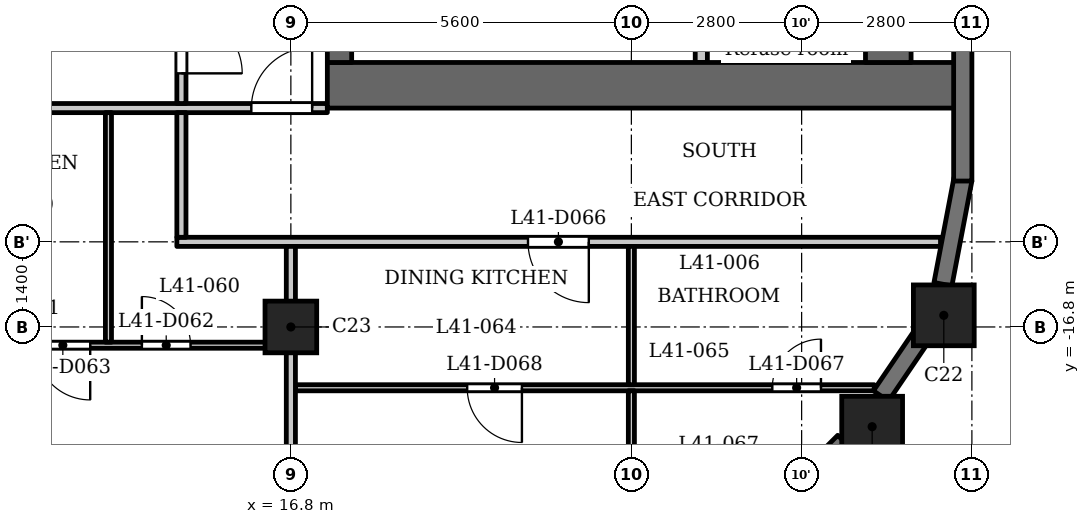
"""IFC4 building model, lengths in metres.
Left out: names, types, materials, properties, quantities, classifications, styles, units other than length and angle.
Written with IfcOpenShell. Run it as: python <this file> out.ifc"""

import sys

from ifc_helpers import new_model, si_unit, direction, frame, frame_2d, origin, origin_2d, place, context, subcontext, project, spatial, rectangle, extrude, element, fill, save


model = new_model("IFC4")
c1 = context("Model", 3, precision=1e-05, world=origin(), true_north=direction((0.0, 1.0)))
c2 = subcontext(c1, "Body", "Model", "MODEL_VIEW")
j1 = project(units=[si_unit("LENGTHUNIT", "METRE"), si_unit("PLANEANGLEUNIT", "RADIAN")], contexts=[c1])
p1 = place(None, origin())
s1 = spatial("IfcSite", under=j1, at=p1, CompositionType="ELEMENT")
p2 = place(p1, origin())
s2 = spatial("IfcBuilding", under=s1, at=p2, CompositionType="ELEMENT")
p3 = place(p2, frame((0.0, 0.0, 160.6)))
s3 = spatial("IfcBuildingStorey", under=s2, at=p3, CompositionType="ELEMENT", Elevation=160.6)
for number, where, z_axis, x_axis in (
    (1, (26.36, -18.44, 0.0), (0.0, 0.0, 1.0), (1.0, 0.0, 0.0)),
    (2, (27.538, -16.609, 0.0), (0.0, 0.0, 1.0), (1.0, 0.0, 0.0)),
):
    element("IfcColumn", number, at=place(p3, frame(where, z_axis=z_axis, x_axis=x_axis)), inside=s3, PredefinedType="COLUMN", context=c2, shape_type="SweptSolid", body=[
        extrude(rectangle(XDim=1.0, YDim=1.0, at=origin_2d()), origin(), (0.0, 0.0, 1.0), 3.5),
    ])
p4 = place(p3, frame((16.8, -16.8, 0.0), z_axis=(0.0, 0.0, 1.0), x_axis=(1.0, 0.0, 0.0)))
e3 = element("IfcColumn", 3, at=p4, inside=s3, PredefinedType="COLUMN", context=c2, shape_type="SweptSolid", body=[
    extrude(rectangle(XDim=0.85, YDim=0.85, at=origin_2d()), origin(), (0.0, 0.0, 1.0), 3.5),
])
p5 = place(p3, frame((23.991, -20.597, 0.0), z_axis=(0.0, 0.0, 1.0), x_axis=(0.707106781187, 0.707106781187, 0.0)))
e4 = element("IfcWall", 4, at=p5, inside=s3, PredefinedType="SOLIDWALL", context=c2, shape_type="SweptSolid", body=[
    extrude(rectangle(XDim=2.7, YDim=0.3, at=frame_2d((1.35, 0.0))), origin(), (0.0, 0.0, 1.0), 2.45),
])
p6 = place(p5, frame((0.75, 0.0, 0.6)))
e5 = element("IfcOpeningElement", 5, at=p6, cuts=e4, PredefinedType="OPENING", context=c2, shape_type="SweptSolid", body=[
    extrude(rectangle(XDim=1.2, YDim=1.55, at=frame_2d((0.6, 0.775))), frame((0.0, 0.16, 0.0), z_axis=(0.0, -1.0, 0.0), x_axis=(1.0, 0.0, 0.0)), (0.0, 0.0, 1.0), 0.32),
])
p7 = place(p3, frame((26.504, -17.934, 0.0), z_axis=(0.0, 0.0, 1.0), x_axis=(0.562145470373, 0.827038372833, 0.0)))
e6 = element("IfcWall", 6, at=p7, inside=s3, PredefinedType="SOLIDWALL", context=c2, shape_type="SweptSolid", body=[
    extrude(rectangle(XDim=1.177, YDim=0.3, at=frame_2d((0.588, 0.0))), origin(), (0.0, 0.0, 1.0), 3.2),
])
p8 = place(p3, frame((27.524, -16.097, 0.0), z_axis=(0.0, 0.0, 1.0), x_axis=(0.187259034321, 0.982310569049, 0.0)))
e7 = element("IfcWall", 7, at=p8, inside=s3, PredefinedType="SOLIDWALL", context=c2, shape_type="SweptSolid", body=[
    extrude(rectangle(XDim=1.756, YDim=0.3, at=frame_2d((0.878, 0.0))), origin(), (0.0, 0.0, 1.0), 2.45),
])
p9 = place(p3, frame((27.85, -14.4, 0.0), z_axis=(0.0, 0.0, 1.0), x_axis=(0.0, 1.0, 0.0)))
e8 = element("IfcWall", 8, at=p9, inside=s3, PredefinedType="SOLIDWALL", context=c2, shape_type="SweptSolid", body=[
    extrude(rectangle(XDim=2.7, YDim=0.3, at=frame_2d((1.35, 0.0))), origin(), (0.0, 0.0, 1.0), 2.45),
])
p10 = place(p3, frame((17.4, -12.825, 0.0), z_axis=(0.0, 0.0, 1.0), x_axis=(1.0, 0.0, 0.0)))
e9 = element("IfcWall", 9, at=p10, inside=s3, PredefinedType="SHEAR", context=c2, shape_type="SweptSolid", body=[
    extrude(rectangle(XDim=10.4, YDim=0.75, at=frame_2d((5.2, 0.0))), origin(), (0.0, 0.0, 1.0), 3.2),
])
p11 = place(p3, frame((17.6, -12.45, 0.0), z_axis=(0.0, 0.0, 1.0), x_axis=(0.0, 1.0, 0.0)))
e10 = element("IfcWall", 10, at=p11, inside=s3, PredefinedType="SHEAR", context=c2, shape_type="SweptSolid", body=[
    extrude(rectangle(XDim=24.9, YDim=0.4, at=frame_2d((12.45, 0.0))), origin(), (0.0, 0.0, 1.0), 3.2),
])
p12 = place(p11, frame((8.65, 0.0, 0.0)))
e11 = element("IfcOpeningElement", 11, at=p12, cuts=e10, PredefinedType="OPENING", context=c2, shape_type="SweptSolid", body=[
    extrude(rectangle(XDim=0.9, YDim=2.1, at=frame_2d((0.45, 1.05))), frame((0.0, 0.21, 0.0), z_axis=(0.0, -1.0, 0.0), x_axis=(1.0, 0.0, 0.0)), (0.0, 0.0, 1.0), 0.42),
])
p13 = place(p11, frame((15.6, 0.0, 0.0)))
e12 = element("IfcOpeningElement", 12, at=p13, cuts=e10, PredefinedType="OPENING", context=c2, shape_type="SweptSolid", body=[
    extrude(rectangle(XDim=1.1, YDim=2.1, at=frame_2d((0.55, 1.05))), frame((0.0, 0.21, 0.0), z_axis=(0.0, -1.0, 0.0), x_axis=(1.0, 0.0, 0.0)), (0.0, 0.0, 1.0), 0.42),
])
p14 = place(p11, frame((18.0, 0.0, 0.0)))
e13 = element("IfcOpeningElement", 13, at=p14, cuts=e10, PredefinedType="OPENING", context=c2, shape_type="SweptSolid", body=[
    extrude(rectangle(XDim=1.1, YDim=2.1, at=frame_2d((0.55, 1.05))), frame((0.0, 0.21, 0.0), z_axis=(0.0, -1.0, 0.0), x_axis=(1.0, 0.0, 0.0)), (0.0, 0.0, 1.0), 0.42),
])
p15 = place(p11, frame((23.025, 0.0, 0.0)))
e14 = element("IfcOpeningElement", 14, at=p15, cuts=e10, PredefinedType="OPENING", context=c2, shape_type="SweptSolid", body=[
    extrude(rectangle(XDim=1.1, YDim=2.1, at=frame_2d((0.55, 1.05))), frame((0.0, 0.21, 0.0), z_axis=(0.0, -1.0, 0.0), x_axis=(1.0, 0.0, 0.0)), (0.0, 0.0, 1.0), 0.42),
])
p16 = place(p11, frame((0.775, 0.0, 0.0)))
e15 = element("IfcOpeningElement", 15, at=p16, cuts=e10, PredefinedType="OPENING", context=c2, shape_type="SweptSolid", body=[
    extrude(rectangle(XDim=1.1, YDim=2.1, at=frame_2d((0.55, 1.05))), frame((0.0, 0.21, 0.0), z_axis=(0.0, -1.0, 0.0), x_axis=(1.0, 0.0, 0.0)), (0.0, 0.0, 1.0), 0.42),
])
p17 = place(p11, frame((12.925, 0.0, 0.0)))
e16 = element("IfcOpeningElement", 16, at=p17, cuts=e10, PredefinedType="OPENING", context=c2, shape_type="SweptSolid", body=[
    extrude(rectangle(XDim=1.8, YDim=2.1, at=frame_2d((0.9, 1.05))), frame((0.0, 0.21, 0.0), z_axis=(0.0, -1.0, 0.0), x_axis=(1.0, 0.0, 0.0)), (0.0, 0.0, 1.0), 0.42),
])
p18 = place(p3, frame((26.625, -12.45, 0.0), z_axis=(0.0, 0.0, 1.0), x_axis=(0.0, 1.0, 0.0)))
e17 = element("IfcWall", 17, at=p18, inside=s3, PredefinedType="SHEAR", context=c2, shape_type="SweptSolid", body=[
    extrude(rectangle(XDim=24.9, YDim=0.75, at=frame_2d((12.45, 0.0))), origin(), (0.0, 0.0, 1.0), 3.2),
])
p19 = place(p3, frame((23.55, -12.45, 0.0), z_axis=(0.0, 0.0, 1.0), x_axis=(0.0, 1.0, 0.0)))
e18 = element("IfcWall", 18, at=p19, inside=s3, PredefinedType="PARTITIONING", context=c2, shape_type="SweptSolid", body=[
    extrude(rectangle(XDim=2.65, YDim=0.2, at=frame_2d((1.325, 0.0))), origin(), (0.0, 0.0, 1.0), 3.2),
])
p20 = place(p19, frame((0.875, 0.0, 0.0)))
e19 = element("IfcOpeningElement", 19, at=p20, cuts=e18, PredefinedType="OPENING", context=c2, shape_type="SweptSolid", body=[
    extrude(rectangle(XDim=0.9, YDim=2.1, at=frame_2d((0.45, 1.05))), frame((0.0, 0.11, 0.0), z_axis=(0.0, -1.0, 0.0), x_axis=(1.0, 0.0, 0.0)), (0.0, 0.0, 1.0), 0.22),
])
p21 = place(p3, frame((16.875, -17.8, 0.0), z_axis=(0.0, 0.0, 1.0), x_axis=(1.0, 0.0, 0.0)))
e20 = element("IfcWall", 20, at=p21, inside=s3, PredefinedType="PARTITIONING", context=c2, shape_type="SweptSolid", body=[
    extrude(rectangle(XDim=9.519, YDim=0.1, at=frame_2d((4.76, 0.0))), origin(), (0.0, 0.0, 1.0), 3.2),
])
p22 = place(p21, frame((7.843, 0.0, 0.0)))
e21 = element("IfcOpeningElement", 21, at=p22, cuts=e20, PredefinedType="OPENING", context=c2, shape_type="SweptSolid", body=[
    extrude(rectangle(XDim=0.8, YDim=2.1, at=frame_2d((0.4, 1.05))), frame((0.0, 0.06, 0.0), z_axis=(0.0, -1.0, 0.0), x_axis=(1.0, 0.0, 0.0)), (0.0, 0.0, 1.0), 0.12),
])
p23 = place(p21, frame((2.825, 0.0, 0.0)))
e22 = element("IfcOpeningElement", 22, at=p23, cuts=e20, PredefinedType="OPENING", context=c2, shape_type="SweptSolid", body=[
    extrude(rectangle(XDim=0.9, YDim=2.1, at=frame_2d((0.45, 1.05))), frame((0.0, 0.06, 0.0), z_axis=(0.0, -1.0, 0.0), x_axis=(1.0, 0.0, 0.0)), (0.0, 0.0, 1.0), 0.12),
])
p24 = place(p3, frame((-16.725, -17.1, 0.0), z_axis=(0.0, 0.0, 1.0), x_axis=(1.0, 0.0, 0.0)))
e23 = element("IfcWall", 23, at=p24, inside=s3, PredefinedType="PARTITIONING", context=c2, shape_type="SweptSolid", body=[
    extrude(rectangle(XDim=33.45, YDim=0.1, at=frame_2d((16.725, 0.0))), origin(), (0.0, 0.0, 1.0), 3.2),
])
p25 = place(p24, frame((0.725, 0.0, 0.0)))
e24 = element("IfcOpeningElement", 24, at=p25, cuts=e23, PredefinedType="OPENING", context=c2, shape_type="SweptSolid", body=[
    extrude(rectangle(XDim=0.8, YDim=2.1, at=frame_2d((0.4, 1.05))), frame((0.0, 0.06, 0.0), z_axis=(0.0, -1.0, 0.0), x_axis=(1.0, 0.0, 0.0)), (0.0, 0.0, 1.0), 0.12),
])
p26 = place(p24, frame((3.175, 0.0, 0.0)))
e25 = element("IfcOpeningElement", 25, at=p26, cuts=e23, PredefinedType="OPENING", context=c2, shape_type="SweptSolid", body=[
    extrude(rectangle(XDim=0.9, YDim=2.1, at=frame_2d((0.45, 1.05))), frame((0.0, 0.06, 0.0), z_axis=(0.0, -1.0, 0.0), x_axis=(1.0, 0.0, 0.0)), (0.0, 0.0, 1.0), 0.12),
])
p27 = place(p24, frame((6.075, 0.0, 0.0)))
e26 = element("IfcOpeningElement", 26, at=p27, cuts=e23, PredefinedType="OPENING", context=c2, shape_type="SweptSolid", body=[
    extrude(rectangle(XDim=0.8, YDim=2.1, at=frame_2d((0.4, 1.05))), frame((0.0, 0.06, 0.0), z_axis=(0.0, -1.0, 0.0), x_axis=(1.0, 0.0, 0.0)), (0.0, 0.0, 1.0), 0.12),
])
p28 = place(p24, frame((9.425, 0.0, 0.0)))
e27 = element("IfcOpeningElement", 27, at=p28, cuts=e23, PredefinedType="OPENING", context=c2, shape_type="SweptSolid", body=[
    extrude(rectangle(XDim=0.9, YDim=2.1, at=frame_2d((0.45, 1.05))), frame((0.0, 0.06, 0.0), z_axis=(0.0, -1.0, 0.0), x_axis=(1.0, 0.0, 0.0)), (0.0, 0.0, 1.0), 0.12),
])
p29 = place(p24, frame((12.675, 0.0, 0.0)))
e28 = element("IfcOpeningElement", 28, at=p29, cuts=e23, PredefinedType="OPENING", context=c2, shape_type="SweptSolid", body=[
    extrude(rectangle(XDim=0.8, YDim=2.1, at=frame_2d((0.4, 1.05))), frame((0.0, 0.06, 0.0), z_axis=(0.0, -1.0, 0.0), x_axis=(1.0, 0.0, 0.0)), (0.0, 0.0, 1.0), 0.12),
])
p30 = place(p24, frame((15.275, 0.0, 0.0)))
e29 = element("IfcOpeningElement", 29, at=p30, cuts=e23, PredefinedType="OPENING", context=c2, shape_type="SweptSolid", body=[
    extrude(rectangle(XDim=0.9, YDim=2.1, at=frame_2d((0.45, 1.05))), frame((0.0, 0.06, 0.0), z_axis=(0.0, -1.0, 0.0), x_axis=(1.0, 0.0, 0.0)), (0.0, 0.0, 1.0), 0.12),
])
p31 = place(p24, frame((20.625, 0.0, 0.0)))
e30 = element("IfcOpeningElement", 30, at=p31, cuts=e23, PredefinedType="OPENING", context=c2, shape_type="SweptSolid", body=[
    extrude(rectangle(XDim=0.8, YDim=2.1, at=frame_2d((0.4, 1.05))), frame((0.0, 0.06, 0.0), z_axis=(0.0, -1.0, 0.0), x_axis=(1.0, 0.0, 0.0)), (0.0, 0.0, 1.0), 0.12),
])
p32 = place(p24, frame((17.375, 0.0, 0.0)))
e31 = element("IfcOpeningElement", 31, at=p32, cuts=e23, PredefinedType="OPENING", context=c2, shape_type="SweptSolid", body=[
    extrude(rectangle(XDim=0.9, YDim=2.1, at=frame_2d((0.45, 1.05))), frame((0.0, 0.06, 0.0), z_axis=(0.0, -1.0, 0.0), x_axis=(1.0, 0.0, 0.0)), (0.0, 0.0, 1.0), 0.12),
])
p33 = place(p24, frame((31.075, 0.0, 0.0)))
e32 = element("IfcOpeningElement", 32, at=p33, cuts=e23, PredefinedType="OPENING", context=c2, shape_type="SweptSolid", body=[
    extrude(rectangle(XDim=0.8, YDim=2.1, at=frame_2d((0.4, 1.05))), frame((0.0, 0.06, 0.0), z_axis=(0.0, -1.0, 0.0), x_axis=(1.0, 0.0, 0.0)), (0.0, 0.0, 1.0), 0.12),
])
p34 = place(p24, frame((29.325, 0.0, 0.0)))
e33 = element("IfcOpeningElement", 33, at=p34, cuts=e23, PredefinedType="OPENING", context=c2, shape_type="SweptSolid", body=[
    extrude(rectangle(XDim=0.9, YDim=2.1, at=frame_2d((0.45, 1.05))), frame((0.0, 0.06, 0.0), z_axis=(0.0, -1.0, 0.0), x_axis=(1.0, 0.0, 0.0)), (0.0, 0.0, 1.0), 0.12),
])
p35 = place(p24, frame((23.725, 0.0, 0.0)))
e34 = element("IfcOpeningElement", 34, at=p35, cuts=e23, PredefinedType="OPENING", context=c2, shape_type="SweptSolid", body=[
    extrude(rectangle(XDim=0.9, YDim=2.1, at=frame_2d((0.45, 1.05))), frame((0.0, 0.06, 0.0), z_axis=(0.0, -1.0, 0.0), x_axis=(1.0, 0.0, 0.0)), (0.0, 0.0, 1.0), 0.12),
])
p36 = place(p24, frame((25.775, 0.0, 0.0)))
e35 = element("IfcOpeningElement", 35, at=p36, cuts=e23, PredefinedType="OPENING", context=c2, shape_type="SweptSolid", body=[
    extrude(rectangle(XDim=0.9, YDim=2.1, at=frame_2d((0.45, 1.05))), frame((0.0, 0.06, 0.0), z_axis=(0.0, -1.0, 0.0), x_axis=(1.0, 0.0, 0.0)), (0.0, 0.0, 1.0), 0.12),
])
p37 = place(p3, frame((14.925, -15.4, 0.0), z_axis=(0.0, 0.0, 1.0), x_axis=(1.0, 0.0, 0.0)))
e36 = element("IfcWall", 36, at=p37, inside=s3, PredefinedType="PARTITIONING", context=c2, shape_type="SweptSolid", body=[
    extrude(rectangle(XDim=12.559, YDim=0.15, at=frame_2d((6.279, 0.0))), origin(), (0.0, 0.0, 1.0), 3.2),
])
p38 = place(p37, frame((5.775, 0.0, 0.0)))
e37 = element("IfcOpeningElement", 37, at=p38, cuts=e36, PredefinedType="OPENING", context=c2, shape_type="SweptSolid", body=[
    extrude(rectangle(XDim=1.0, YDim=2.1, at=frame_2d((0.5, 1.05))), frame((0.0, 0.085, 0.0), z_axis=(0.0, -1.0, 0.0), x_axis=(1.0, 0.0, 0.0)), (0.0, 0.0, 1.0), 0.17),
])
p39 = place(p3, frame((-17.4, -13.2, 0.0), z_axis=(0.0, 0.0, 1.0), x_axis=(1.0, 0.0, 0.0)))
e38 = element("IfcWall", 38, at=p39, inside=s3, PredefinedType="PARTITIONING", context=c2, shape_type="SweptSolid", body=[
    extrude(rectangle(XDim=34.8, YDim=0.15, at=frame_2d((17.4, 0.0))), origin(), (0.0, 0.0, 1.0), 3.2),
])
p40 = place(p39, frame((0.15, 0.0, 0.0)))
e39 = element("IfcOpeningElement", 39, at=p40, cuts=e38, PredefinedType="OPENING", context=c2, shape_type="SweptSolid", body=[
    extrude(rectangle(XDim=1.0, YDim=2.1, at=frame_2d((0.5, 1.05))), frame((0.0, 0.085, 0.0), z_axis=(0.0, -1.0, 0.0), x_axis=(1.0, 0.0, 0.0)), (0.0, 0.0, 1.0), 0.17),
])
p41 = place(p39, frame((33.55, 0.0, 0.0)))
e40 = element("IfcOpeningElement", 40, at=p41, cuts=e38, PredefinedType="OPENING", context=c2, shape_type="SweptSolid", body=[
    extrude(rectangle(XDim=1.0, YDim=2.1, at=frame_2d((0.5, 1.05))), frame((0.0, 0.085, 0.0), z_axis=(0.0, -1.0, 0.0), x_axis=(1.0, 0.0, 0.0)), (0.0, 0.0, 1.0), 0.17),
])
p42 = place(p39, frame((3.5, 0.0, 0.0)))
e41 = element("IfcOpeningElement", 41, at=p42, cuts=e38, PredefinedType="OPENING", context=c2, shape_type="SweptSolid", body=[
    extrude(rectangle(XDim=1.0, YDim=2.1, at=frame_2d((0.5, 1.05))), frame((0.0, 0.085, 0.0), z_axis=(0.0, -1.0, 0.0), x_axis=(1.0, 0.0, 0.0)), (0.0, 0.0, 1.0), 0.17),
])
p43 = place(p39, frame((10.1, 0.0, 0.0)))
e42 = element("IfcOpeningElement", 42, at=p43, cuts=e38, PredefinedType="OPENING", context=c2, shape_type="SweptSolid", body=[
    extrude(rectangle(XDim=1.0, YDim=2.1, at=frame_2d((0.5, 1.05))), frame((0.0, 0.085, 0.0), z_axis=(0.0, -1.0, 0.0), x_axis=(1.0, 0.0, 0.0)), (0.0, 0.0, 1.0), 0.17),
])
p44 = place(p39, frame((15.7, 0.0, 0.0)))
e43 = element("IfcOpeningElement", 43, at=p44, cuts=e38, PredefinedType="OPENING", context=c2, shape_type="SweptSolid", body=[
    extrude(rectangle(XDim=1.0, YDim=2.1, at=frame_2d((0.5, 1.05))), frame((0.0, 0.085, 0.0), z_axis=(0.0, -1.0, 0.0), x_axis=(1.0, 0.0, 0.0)), (0.0, 0.0, 1.0), 0.17),
])
p45 = place(p39, frame((18.05, 0.0, 0.0)))
e44 = element("IfcOpeningElement", 44, at=p45, cuts=e38, PredefinedType="OPENING", context=c2, shape_type="SweptSolid", body=[
    extrude(rectangle(XDim=1.0, YDim=2.1, at=frame_2d((0.5, 1.05))), frame((0.0, 0.085, 0.0), z_axis=(0.0, -1.0, 0.0), x_axis=(1.0, 0.0, 0.0)), (0.0, 0.0, 1.0), 0.17),
])
p46 = place(p39, frame((26.9, 0.0, 0.0)))
e45 = element("IfcOpeningElement", 45, at=p46, cuts=e38, PredefinedType="OPENING", context=c2, shape_type="SweptSolid", body=[
    extrude(rectangle(XDim=1.0, YDim=2.1, at=frame_2d((0.5, 1.05))), frame((0.0, 0.085, 0.0), z_axis=(0.0, -1.0, 0.0), x_axis=(1.0, 0.0, 0.0)), (0.0, 0.0, 1.0), 0.17),
])
p47 = place(p3, frame((13.8, -17.05, 0.0), z_axis=(0.0, 0.0, 1.0), x_axis=(0.0, 1.0, 0.0)))
e46 = element("IfcWall", 46, at=p47, inside=s3, PredefinedType="PARTITIONING", context=c2, shape_type="SweptSolid", body=[
    extrude(rectangle(XDim=3.775, YDim=0.1, at=frame_2d((1.888, 0.0))), origin(), (0.0, 0.0, 1.0), 3.2),
])
p48 = place(p3, frame((15.0, -15.325, 0.0), z_axis=(0.0, 0.0, 1.0), x_axis=(0.0, 1.0, 0.0)))
e47 = element("IfcWall", 47, at=p48, inside=s3, PredefinedType="PARTITIONING", context=c2, shape_type="SweptSolid", body=[
    extrude(rectangle(XDim=2.05, YDim=0.15, at=frame_2d((1.025, 0.0))), origin(), (0.0, 0.0, 1.0), 3.2),
])
p49 = place(p3, frame((15.0, -13.125, 0.0), z_axis=(0.0, 0.0, 1.0), x_axis=(0.0, 1.0, 0.0)))
e48 = element("IfcWall", 48, at=p49, inside=s3, PredefinedType="PARTITIONING", context=c2, shape_type="SweptSolid", body=[
    extrude(rectangle(XDim=6.356, YDim=0.15, at=frame_2d((3.178, 0.0))), origin(), (0.0, 0.0, 1.0), 3.2),
])
p50 = place(p49, frame((0.496, 0.0, 0.0)))
e49 = element("IfcOpeningElement", 49, at=p50, cuts=e48, PredefinedType="OPENING", context=c2, shape_type="SweptSolid", body=[
    extrude(rectangle(XDim=1.0, YDim=2.1, at=frame_2d((0.5, 1.05))), frame((0.0, 0.085, 0.0), z_axis=(0.0, -1.0, 0.0), x_axis=(1.0, 0.0, 0.0)), (0.0, 0.0, 1.0), 0.17),
])
p51 = place(p3, frame((16.8, -22.88, 0.0), z_axis=(0.0, 0.0, 1.0), x_axis=(0.0, 1.0, 0.0)))
e50 = element("IfcWall", 50, at=p51, inside=s3, PredefinedType="PARTITIONING", context=c2, shape_type="SweptSolid", body=[
    extrude(rectangle(XDim=7.405, YDim=0.15, at=frame_2d((3.702, 0.0))), origin(), (0.0, 0.0, 1.0), 3.2),
])
p52 = place(p3, frame((22.4, -21.72, 0.0), z_axis=(0.0, 0.0, 1.0), x_axis=(0.0, 1.0, 0.0)))
e51 = element("IfcWall", 51, at=p52, inside=s3, PredefinedType="PARTITIONING", context=c2, shape_type="SweptSolid", body=[
    extrude(rectangle(XDim=3.87, YDim=0.1, at=frame_2d((1.935, 0.0))), origin(), (0.0, 0.0, 1.0), 3.2),
])
p53 = place(p52, frame((0.872, 0.0, 0.0)))
e52 = element("IfcOpeningElement", 52, at=p53, cuts=e51, PredefinedType="OPENING", context=c2, shape_type="SweptSolid", body=[
    extrude(rectangle(XDim=0.9, YDim=2.1, at=frame_2d((0.45, 1.05))), frame((0.0, 0.06, 0.0), z_axis=(0.0, -1.0, 0.0), x_axis=(1.0, 0.0, 0.0)), (0.0, 0.0, 1.0), 0.12),
])
p54 = place(p3, frame((22.4, -17.75, 0.0), z_axis=(0.0, 0.0, 1.0), x_axis=(0.0, 1.0, 0.0)))
e53 = element("IfcWall", 53, at=p54, inside=s3, PredefinedType="PARTITIONING", context=c2, shape_type="SweptSolid", body=[
    extrude(rectangle(XDim=2.275, YDim=0.1, at=frame_2d((1.137, 0.0))), origin(), (0.0, 0.0, 1.0), 3.2),
])
p55 = place(p50, origin())
e54 = element("IfcDoor", 54, at=p55, inside=s3, OperationType="SINGLE_SWING_LEFT", PredefinedType="DOOR", context=c2, shape_type="SweptSolid", body=[
    extrude(rectangle(XDim=1.0, YDim=2.1, at=frame_2d((0.5, 1.05))), frame((0.0, 0.025, 0.0), z_axis=(0.0, -1.0, 0.0), x_axis=(1.0, 0.0, 0.0)), (0.0, 0.0, 1.0), 0.05),
])
fill(e49, e54)
p56 = place(p41, origin())
e55 = element("IfcDoor", 55, at=p56, inside=s3, OperationType="SINGLE_SWING_LEFT", PredefinedType="DOOR", context=c2, shape_type="SweptSolid", body=[
    extrude(rectangle(XDim=1.0, YDim=2.1, at=frame_2d((0.5, 1.05))), frame((0.0, 0.025, 0.0), z_axis=(0.0, -1.0, 0.0), x_axis=(1.0, 0.0, 0.0)), (0.0, 0.0, 1.0), 0.05),
])
fill(e40, e55)
p57 = place(p33, origin())
e56 = element("IfcDoor", 56, at=p57, inside=s3, OperationType="SINGLE_SWING_RIGHT", PredefinedType="DOOR", context=c2, shape_type="SweptSolid", body=[
    extrude(rectangle(XDim=0.8, YDim=2.1, at=frame_2d((0.4, 1.05))), frame((0.0, 0.025, 0.0), z_axis=(0.0, -1.0, 0.0), x_axis=(1.0, 0.0, 0.0)), (0.0, 0.0, 1.0), 0.05),
])
fill(e32, e56)
p58 = place(p34, origin())
e57 = element("IfcDoor", 57, at=p58, inside=s3, OperationType="SINGLE_SWING_RIGHT", PredefinedType="DOOR", context=c2, shape_type="SweptSolid", body=[
    extrude(rectangle(XDim=0.9, YDim=2.1, at=frame_2d((0.45, 1.05))), frame((0.0, 0.025, 0.0), z_axis=(0.0, -1.0, 0.0), x_axis=(1.0, 0.0, 0.0)), (0.0, 0.0, 1.0), 0.05),
])
fill(e33, e57)
p59 = place(p38, origin())
e58 = element("IfcDoor", 58, at=p59, inside=s3, OperationType="SINGLE_SWING_RIGHT", PredefinedType="DOOR", context=c2, shape_type="SweptSolid", body=[
    extrude(rectangle(XDim=1.0, YDim=2.1, at=frame_2d((0.5, 1.05))), frame((0.0, 0.025, 0.0), z_axis=(0.0, -1.0, 0.0), x_axis=(1.0, 0.0, 0.0)), (0.0, 0.0, 1.0), 0.05),
])
fill(e37, e58)
p60 = place(p22, origin())
e59 = element("IfcDoor", 59, at=p60, inside=s3, OperationType="SINGLE_SWING_LEFT", PredefinedType="DOOR", context=c2, shape_type="SweptSolid", body=[
    extrude(rectangle(XDim=0.8, YDim=2.1, at=frame_2d((0.4, 1.05))), frame((0.0, 0.025, 0.0), z_axis=(0.0, -1.0, 0.0), x_axis=(1.0, 0.0, 0.0)), (0.0, 0.0, 1.0), 0.05),
])
fill(e21, e59)
p61 = place(p23, origin())
e60 = element("IfcDoor", 60, at=p61, inside=s3, OperationType="SINGLE_SWING_RIGHT", PredefinedType="DOOR", context=c2, shape_type="SweptSolid", body=[
    extrude(rectangle(XDim=0.9, YDim=2.1, at=frame_2d((0.45, 1.05))), frame((0.0, 0.025, 0.0), z_axis=(0.0, -1.0, 0.0), x_axis=(1.0, 0.0, 0.0)), (0.0, 0.0, 1.0), 0.05),
])
fill(e22, e60)
save(model, sys.argv[1])
